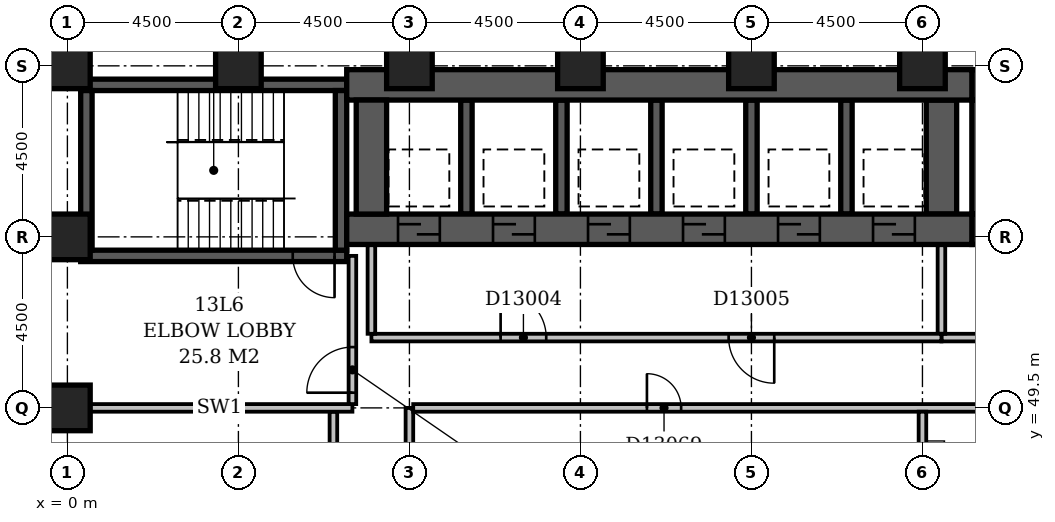
"""IFC4 building model, lengths in metres.
Left out: names, types, materials, properties, quantities, classifications, styles, units other than length and angle.
Written with IfcOpenShell. Run it as: python <this file> out.ifc"""

import sys

from ifc_helpers import new_model, si_unit, direction, frame, frame_2d, origin, origin_2d, place, context, subcontext, project, spatial, rectangle, extrude, element, fill, save


model = new_model("IFC4")
c1 = context("Model", 3, precision=1e-05, world=origin(), true_north=direction((0.0, 1.0)))
c2 = subcontext(c1, "Body", "Model", "MODEL_VIEW")
j1 = project(units=[si_unit("LENGTHUNIT", "METRE"), si_unit("PLANEANGLEUNIT", "RADIAN")], contexts=[c1])
p1 = place(None, origin())
s1 = spatial("IfcSite", under=j1, at=p1, CompositionType="ELEMENT")
p2 = place(p1, origin())
s2 = spatial("IfcBuilding", under=s1, at=p2, CompositionType="ELEMENT")
p3 = place(p2, frame((0.0, 0.0, 57.8)))
s3 = spatial("IfcBuildingStorey", under=s2, at=p3, CompositionType="ELEMENT", Elevation=57.8)
p4 = place(p3, frame((0.35, 53.5, -0.3), z_axis=(0.0, 0.0, 1.0), x_axis=(1.0, 0.0, 0.0)))
e1 = element("IfcWall", 1, at=p4, inside=s3, PredefinedType="SHEAR", context=c2, shape_type="SweptSolid", body=[
    extrude(rectangle(XDim=7.0, YDim=0.3, at=frame_2d((3.5, 0.0))), origin(), (0.0, 0.0, 1.0), 3.6),
])
p5 = place(p4, frame((5.58, 0.0, 0.3)))
e2 = element("IfcOpeningElement", 2, at=p5, cuts=e1, PredefinedType="OPENING", context=c2, shape_type="SweptSolid", body=[
    extrude(rectangle(XDim=1.1, YDim=2.1, at=frame_2d((0.55, 1.05))), frame((0.0, 0.162, 0.0), z_axis=(0.0, -1.0, 0.0), x_axis=(1.0, 0.0, 0.0)), (0.0, 0.0, 1.0), 0.324),
])
p6 = place(p3, frame((0.35, 58.0, -0.3), z_axis=(0.0, 0.0, 1.0), x_axis=(1.0, 0.0, 0.0)))
e3 = element("IfcWall", 3, at=p6, inside=s3, PredefinedType="SHEAR", context=c2, shape_type="SweptSolid", body=[
    extrude(rectangle(XDim=7.0, YDim=0.3, at=frame_2d((3.5, 0.0))), origin(), (0.0, 0.0, 1.0), 3.6),
])
for number, where, z_axis, x_axis in (
    (4, (0.5, 53.65, -0.3), (0.0, 0.0, 1.0), (0.0, 1.0, 0.0)),
    (5, (7.2, 53.65, -0.3), (0.0, 0.0, 1.0), (0.0, 1.0, 0.0)),
):
    element("IfcWall", number, at=place(p3, frame(where, z_axis=z_axis, x_axis=x_axis)), inside=s3, PredefinedType="SHEAR", context=c2, shape_type="SweptSolid", body=[
        extrude(rectangle(XDim=4.2, YDim=0.3, at=frame_2d((2.1, 0.0))), origin(), (0.0, 0.0, 1.0), 3.6),
    ])
p7 = place(p3, frame((7.35, 54.2, -0.3), z_axis=(0.0, 0.0, 1.0), x_axis=(1.0, 0.0, 0.0)))
e6 = element("IfcWall", 6, at=p7, inside=s3, PredefinedType="SHEAR", context=c2, shape_type="SweptSolid", body=[
    extrude(rectangle(XDim=16.45, YDim=0.8, at=frame_2d((8.225, 0.0))), origin(), (0.0, 0.0, 1.0), 3.6),
])
p8 = place(p7, frame((1.35, 0.0, 0.3)))
e7 = element("IfcOpeningElement", 7, at=p8, cuts=e6, PredefinedType="OPENING", context=c2, shape_type="SweptSolid", body=[
    extrude(rectangle(XDim=1.1, YDim=2.1, at=frame_2d((0.55, 1.05))), frame((0.0, 0.412, 0.0), z_axis=(0.0, -1.0, 0.0), x_axis=(1.0, 0.0, 0.0)), (0.0, 0.0, 1.0), 0.824),
])
p9 = place(p7, frame((3.85, 0.0, 0.3)))
e8 = element("IfcOpeningElement", 8, at=p9, cuts=e6, PredefinedType="OPENING", context=c2, shape_type="SweptSolid", body=[
    extrude(rectangle(XDim=1.1, YDim=2.1, at=frame_2d((0.55, 1.05))), frame((0.0, 0.412, 0.0), z_axis=(0.0, -1.0, 0.0), x_axis=(1.0, 0.0, 0.0)), (0.0, 0.0, 1.0), 0.824),
])
p10 = place(p7, frame((6.35, 0.0, 0.3)))
e9 = element("IfcOpeningElement", 9, at=p10, cuts=e6, PredefinedType="OPENING", context=c2, shape_type="SweptSolid", body=[
    extrude(rectangle(XDim=1.1, YDim=2.1, at=frame_2d((0.55, 1.05))), frame((0.0, 0.412, 0.0), z_axis=(0.0, -1.0, 0.0), x_axis=(1.0, 0.0, 0.0)), (0.0, 0.0, 1.0), 0.824),
])
p11 = place(p7, frame((8.85, 0.0, 0.3)))
e10 = element("IfcOpeningElement", 10, at=p11, cuts=e6, PredefinedType="OPENING", context=c2, shape_type="SweptSolid", body=[
    extrude(rectangle(XDim=1.1, YDim=2.1, at=frame_2d((0.55, 1.05))), frame((0.0, 0.412, 0.0), z_axis=(0.0, -1.0, 0.0), x_axis=(1.0, 0.0, 0.0)), (0.0, 0.0, 1.0), 0.824),
])
p12 = place(p7, frame((11.35, 0.0, 0.3)))
e11 = element("IfcOpeningElement", 11, at=p12, cuts=e6, PredefinedType="OPENING", context=c2, shape_type="SweptSolid", body=[
    extrude(rectangle(XDim=1.1, YDim=2.1, at=frame_2d((0.55, 1.05))), frame((0.0, 0.412, 0.0), z_axis=(0.0, -1.0, 0.0), x_axis=(1.0, 0.0, 0.0)), (0.0, 0.0, 1.0), 0.824),
])
p13 = place(p7, frame((13.85, 0.0, 0.3)))
e12 = element("IfcOpeningElement", 12, at=p13, cuts=e6, PredefinedType="OPENING", context=c2, shape_type="SweptSolid", body=[
    extrude(rectangle(XDim=1.1, YDim=2.1, at=frame_2d((0.55, 1.05))), frame((0.0, 0.412, 0.0), z_axis=(0.0, -1.0, 0.0), x_axis=(1.0, 0.0, 0.0)), (0.0, 0.0, 1.0), 0.824),
])
p14 = place(p3, frame((7.35, 58.0, -0.3), z_axis=(0.0, 0.0, 1.0), x_axis=(1.0, 0.0, 0.0)))
e13 = element("IfcWall", 13, at=p14, inside=s3, PredefinedType="SHEAR", context=c2, shape_type="SweptSolid", body=[
    extrude(rectangle(XDim=16.45, YDim=0.8, at=frame_2d((8.225, 0.0))), origin(), (0.0, 0.0, 1.0), 3.6),
])
p15 = place(p3, frame((8.0, 54.6, -0.3), z_axis=(0.0, 0.0, 1.0), x_axis=(0.0, 1.0, 0.0)))
e14 = element("IfcWall", 14, at=p15, inside=s3, PredefinedType="SHEAR", context=c2, shape_type="SweptSolid", body=[
    extrude(rectangle(XDim=3.0, YDim=0.8, at=frame_2d((1.5, 0.0))), origin(), (0.0, 0.0, 1.0), 3.6),
])
for number, where, z_axis, x_axis in (
    (15, (10.5, 54.6, -0.3), (0.0, 0.0, 1.0), (0.0, 1.0, 0.0)),
    (16, (13.0, 54.6, -0.3), (0.0, 0.0, 1.0), (0.0, 1.0, 0.0)),
    (17, (15.5, 54.6, -0.3), (0.0, 0.0, 1.0), (0.0, 1.0, 0.0)),
    (18, (18.0, 54.6, -0.3), (0.0, 0.0, 1.0), (0.0, 1.0, 0.0)),
    (19, (20.5, 54.6, -0.3), (0.0, 0.0, 1.0), (0.0, 1.0, 0.0)),
):
    element("IfcWall", number, at=place(p3, frame(where, z_axis=z_axis, x_axis=x_axis)), inside=s3, PredefinedType="SHEAR", context=c2, shape_type="SweptSolid", body=[
        extrude(rectangle(XDim=3.0, YDim=0.3, at=frame_2d((1.5, 0.0))), origin(), (0.0, 0.0, 1.0), 3.6),
    ])
p16 = place(p3, frame((23.0, 54.6, -0.3), z_axis=(0.0, 0.0, 1.0), x_axis=(0.0, 1.0, 0.0)))
e20 = element("IfcWall", 20, at=p16, inside=s3, PredefinedType="SHEAR", context=c2, shape_type="SweptSolid", body=[
    extrude(rectangle(XDim=3.0, YDim=0.8, at=frame_2d((1.5, 0.0))), origin(), (0.0, 0.0, 1.0), 3.6),
])
p17 = place(p3, frame((23.8, 54.2, -0.3), z_axis=(0.0, 0.0, 1.0), x_axis=(1.0, 0.0, 0.0)))
e21 = element("IfcWall", 21, at=p17, inside=s3, PredefinedType="SHEAR", context=c2, shape_type="SweptSolid", body=[
    extrude(rectangle(XDim=3.3, YDim=0.8, at=frame_2d((1.65, 0.0))), origin(), (0.0, 0.0, 1.0), 3.6),
])
p18 = place(p17, frame((1.1, 0.0, 0.3)))
e22 = element("IfcOpeningElement", 22, at=p18, cuts=e21, PredefinedType="OPENING", context=c2, shape_type="SweptSolid", body=[
    extrude(rectangle(XDim=1.1, YDim=2.1, at=frame_2d((0.55, 1.05))), frame((0.0, 0.412, 0.0), z_axis=(0.0, -1.0, 0.0), x_axis=(1.0, 0.0, 0.0)), (0.0, 0.0, 1.0), 0.824),
])
p19 = place(p3, frame((23.8, 58.0, -0.3), z_axis=(0.0, 0.0, 1.0), x_axis=(1.0, 0.0, 0.0)))
e23 = element("IfcWall", 23, at=p19, inside=s3, PredefinedType="SHEAR", context=c2, shape_type="SweptSolid", body=[
    extrude(rectangle(XDim=3.3, YDim=0.8, at=frame_2d((1.65, 0.0))), origin(), (0.0, 0.0, 1.0), 3.6),
])
p20 = place(p3, frame((24.2, 54.6, -0.3), z_axis=(0.0, 0.0, 1.0), x_axis=(0.0, 1.0, 0.0)))
e24 = element("IfcWall", 24, at=p20, inside=s3, PredefinedType="SHEAR", context=c2, shape_type="SweptSolid", body=[
    extrude(rectangle(XDim=3.0, YDim=0.8, at=frame_2d((1.5, 0.0))), origin(), (0.0, 0.0, 1.0), 3.6),
])
for number, where, z_axis, x_axis in (
    (25, (0.0, 49.5, -0.3), (0.0, 0.0, 1.0), (1.0, 0.0, 0.0)),
    (26, (0.0, 54.0, -0.3), (0.0, 0.0, 1.0), (1.0, 0.0, 0.0)),
    (27, (0.0, 58.5, -0.3), (0.0, 0.0, 1.0), (1.0, 0.0, 0.0)),
    (28, (4.5, 58.5, -0.3), (0.0, 0.0, 1.0), (1.0, 0.0, 0.0)),
    (29, (9.0, 58.5, -0.3), (0.0, 0.0, 1.0), (1.0, 0.0, 0.0)),
    (30, (13.5, 58.5, -0.3), (0.0, 0.0, 1.0), (1.0, 0.0, 0.0)),
    (31, (18.0, 58.5, -0.3), (0.0, 0.0, 1.0), (1.0, 0.0, 0.0)),
    (32, (22.5, 58.5, -0.3), (0.0, 0.0, 1.0), (1.0, 0.0, 0.0)),
):
    element("IfcColumn", number, at=place(p3, frame(where, z_axis=z_axis, x_axis=x_axis)), inside=s3, PredefinedType="COLUMN", context=c2, shape_type="SweptSolid", body=[
        extrude(rectangle(XDim=1.2, YDim=1.2, at=origin_2d()), origin(), (0.0, 0.0, 1.0), 3.6),
    ])
p21 = place(p3, frame((8.0, 51.35, 0.0), z_axis=(0.0, 0.0, 1.0), x_axis=(1.0, 0.0, 0.0)))
e33 = element("IfcWall", 33, at=p21, inside=s3, PredefinedType="PARTITIONING", context=c2, shape_type="SweptSolid", body=[
    extrude(rectangle(XDim=15.0, YDim=0.2, at=frame_2d((7.5, 0.0))), origin(), (0.0, 0.0, 1.0), 3.3),
])
p22 = place(p21, frame((3.4, 0.0, 0.0)))
e34 = element("IfcOpeningElement", 34, at=p22, cuts=e33, PredefinedType="OPENING", context=c2, shape_type="SweptSolid", body=[
    extrude(rectangle(XDim=1.2, YDim=2.1, at=frame_2d((0.6, 1.05))), frame((0.0, 0.112, 0.0), z_axis=(0.0, -1.0, 0.0), x_axis=(1.0, 0.0, 0.0)), (0.0, 0.0, 1.0), 0.224),
])
p23 = place(p21, frame((9.4, 0.0, 0.0)))
e35 = element("IfcOpeningElement", 35, at=p23, cuts=e33, PredefinedType="OPENING", context=c2, shape_type="SweptSolid", body=[
    extrude(rectangle(XDim=1.2, YDim=2.1, at=frame_2d((0.6, 1.05))), frame((0.0, 0.112, 0.0), z_axis=(0.0, -1.0, 0.0), x_axis=(1.0, 0.0, 0.0)), (0.0, 0.0, 1.0), 0.224),
])
for number, where, z_axis, x_axis in (
    (36, (23.0, 51.45, 0.0), (0.0, 0.0, 1.0), (0.0, 1.0, 0.0)),
    (37, (8.0, 51.45, 0.0), (0.0, 0.0, 1.0), (0.0, 1.0, 0.0)),
):
    element("IfcWall", number, at=place(p3, frame(where, z_axis=z_axis, x_axis=x_axis)), inside=s3, PredefinedType="PARTITIONING", context=c2, shape_type="SweptSolid", body=[
        extrude(rectangle(XDim=2.33, YDim=0.2, at=frame_2d((1.165, 0.0))), origin(), (0.0, 0.0, 1.0), 3.3),
    ])
p24 = place(p3, frame((23.0, 51.35, 0.0), z_axis=(0.0, 0.0, 1.0), x_axis=(1.0, 0.0, 0.0)))
e38 = element("IfcWall", 38, at=p24, inside=s3, PredefinedType="PARTITIONING", context=c2, shape_type="SweptSolid", body=[
    extrude(rectangle(XDim=4.8, YDim=0.2, at=frame_2d((2.4, 0.0))), origin(), (0.0, 0.0, 1.0), 3.3),
])
p25 = place(p24, frame((1.65, 0.0, 0.0)))
e39 = element("IfcOpeningElement", 39, at=p25, cuts=e38, PredefinedType="OPENING", context=c2, shape_type="SweptSolid", body=[
    extrude(rectangle(XDim=1.2, YDim=2.1, at=frame_2d((0.6, 1.05))), frame((0.0, 0.112, 0.0), z_axis=(0.0, -1.0, 0.0), x_axis=(1.0, 0.0, 0.0)), (0.0, 0.0, 1.0), 0.224),
])
p26 = place(p3, frame((0.5, 49.5, 0.0), z_axis=(0.0, 0.0, 1.0), x_axis=(1.0, 0.0, 0.0)))
e40 = element("IfcWall", 40, at=p26, inside=s3, PredefinedType="PARTITIONING", context=c2, shape_type="SweptSolid", body=[
    extrude(rectangle(XDim=7.0, YDim=0.2, at=frame_2d((3.5, 0.0))), origin(), (0.0, 0.0, 1.0), 3.3),
])
p27 = place(p3, frame((7.5, 49.6, 0.0), z_axis=(0.0, 0.0, 1.0), x_axis=(0.0, 1.0, 0.0)))
e41 = element("IfcWall", 41, at=p27, inside=s3, PredefinedType="PARTITIONING", context=c2, shape_type="SweptSolid", body=[
    extrude(rectangle(XDim=3.9, YDim=0.2, at=frame_2d((1.95, 0.0))), origin(), (0.0, 0.0, 1.0), 3.3),
])
p28 = place(p27, frame((0.3, 0.0, 0.0)))
e42 = element("IfcOpeningElement", 42, at=p28, cuts=e41, PredefinedType="OPENING", context=c2, shape_type="SweptSolid", body=[
    extrude(rectangle(XDim=1.2, YDim=2.1, at=frame_2d((0.6, 1.05))), frame((0.0, 0.112, 0.0), z_axis=(0.0, -1.0, 0.0), x_axis=(1.0, 0.0, 0.0)), (0.0, 0.0, 1.0), 0.224),
])
p29 = place(p3, frame((9.0, 5.0, 0.0), z_axis=(0.0, 0.0, 1.0), x_axis=(0.0, 1.0, 0.0)))
e43 = element("IfcWall", 43, at=p29, inside=s3, PredefinedType="PARTITIONING", context=c2, shape_type="SweptSolid", body=[
    extrude(rectangle(XDim=44.5, YDim=0.2, at=frame_2d((22.25, 0.0))), origin(), (0.0, 0.0, 1.0), 3.3),
])
p30 = place(p29, frame((28.05, 0.0, 0.0)))
e44 = element("IfcOpeningElement", 44, at=p30, cuts=e43, PredefinedType="OPENING", context=c2, shape_type="SweptSolid", body=[
    extrude(rectangle(XDim=1.0, YDim=2.1, at=frame_2d((0.5, 1.05))), frame((0.0, 0.112, 0.0), z_axis=(0.0, -1.0, 0.0), x_axis=(1.0, 0.0, 0.0)), (0.0, 0.0, 1.0), 0.224),
])
p31 = place(p29, frame((23.95, 0.0, 0.0)))
e45 = element("IfcOpeningElement", 45, at=p31, cuts=e43, PredefinedType="OPENING", context=c2, shape_type="SweptSolid", body=[
    extrude(rectangle(XDim=1.0, YDim=2.1, at=frame_2d((0.5, 1.05))), frame((0.0, 0.112, 0.0), z_axis=(0.0, -1.0, 0.0), x_axis=(1.0, 0.0, 0.0)), (0.0, 0.0, 1.0), 0.224),
])
p32 = place(p29, frame((18.3, 0.0, 0.0)))
e46 = element("IfcOpeningElement", 46, at=p32, cuts=e43, PredefinedType="OPENING", context=c2, shape_type="SweptSolid", body=[
    extrude(rectangle(XDim=1.0, YDim=2.1, at=frame_2d((0.5, 1.05))), frame((0.0, 0.112, 0.0), z_axis=(0.0, -1.0, 0.0), x_axis=(1.0, 0.0, 0.0)), (0.0, 0.0, 1.0), 0.224),
])
p33 = place(p29, frame((9.3, 0.0, 0.0)))
e47 = element("IfcOpeningElement", 47, at=p33, cuts=e43, PredefinedType="OPENING", context=c2, shape_type="SweptSolid", body=[
    extrude(rectangle(XDim=1.0, YDim=2.1, at=frame_2d((0.5, 1.05))), frame((0.0, 0.112, 0.0), z_axis=(0.0, -1.0, 0.0), x_axis=(1.0, 0.0, 0.0)), (0.0, 0.0, 1.0), 0.224),
])
p34 = place(p29, frame((32.75, 0.0, 0.0)))
e48 = element("IfcOpeningElement", 48, at=p34, cuts=e43, PredefinedType="OPENING", context=c2, shape_type="SweptSolid", body=[
    extrude(rectangle(XDim=0.9, YDim=2.1, at=frame_2d((0.45, 1.05))), frame((0.0, 0.112, 0.0), z_axis=(0.0, -1.0, 0.0), x_axis=(1.0, 0.0, 0.0)), (0.0, 0.0, 1.0), 0.224),
])
p35 = place(p29, frame((1.5, 0.0, 0.0)))
e49 = element("IfcOpeningElement", 49, at=p35, cuts=e43, PredefinedType="OPENING", context=c2, shape_type="SweptSolid", body=[
    extrude(rectangle(XDim=0.9, YDim=2.1, at=frame_2d((0.45, 1.05))), frame((0.0, 0.112, 0.0), z_axis=(0.0, -1.0, 0.0), x_axis=(1.0, 0.0, 0.0)), (0.0, 0.0, 1.0), 0.224),
])
p36 = place(p3, frame((7.0, 34.6, 0.0), z_axis=(0.0, 0.0, 1.0), x_axis=(0.0, 1.0, 0.0)))
e50 = element("IfcWall", 50, at=p36, inside=s3, PredefinedType="PARTITIONING", context=c2, shape_type="SweptSolid", body=[
    extrude(rectangle(XDim=14.8, YDim=0.2, at=frame_2d((7.4, 0.0))), origin(), (0.0, 0.0, 1.0), 3.3),
])
p37 = place(p36, frame((6.95, 0.0, 0.0)))
e51 = element("IfcOpeningElement", 51, at=p37, cuts=e50, PredefinedType="OPENING", context=c2, shape_type="SweptSolid", body=[
    extrude(rectangle(XDim=0.9, YDim=2.1, at=frame_2d((0.45, 1.05))), frame((0.0, 0.112, 0.0), z_axis=(0.0, -1.0, 0.0), x_axis=(1.0, 0.0, 0.0)), (0.0, 0.0, 1.0), 0.224),
])
p38 = place(p3, frame((22.5, 36.6, 0.0), z_axis=(0.0, 0.0, 1.0), x_axis=(0.0, 1.0, 0.0)))
e52 = element("IfcWall", 52, at=p38, inside=s3, PredefinedType="PARTITIONING", context=c2, shape_type="SweptSolid", body=[
    extrude(rectangle(XDim=12.8, YDim=0.2, at=frame_2d((6.4, 0.0))), origin(), (0.0, 0.0, 1.0), 3.3),
])
p39 = place(p3, frame((9.1, 49.5, 0.0), z_axis=(0.0, 0.0, 1.0), x_axis=(1.0, 0.0, 0.0)))
e53 = element("IfcWall", 53, at=p39, inside=s3, PredefinedType="PARTITIONING", context=c2, shape_type="SweptSolid", body=[
    extrude(rectangle(XDim=57.8, YDim=0.2, at=frame_2d((28.9, 0.0))), origin(), (0.0, 0.0, 1.0), 3.3),
])
p40 = place(p39, frame((15.35, 0.0, 0.0)))
e54 = element("IfcOpeningElement", 54, at=p40, cuts=e53, PredefinedType="OPENING", context=c2, shape_type="SweptSolid", body=[
    extrude(rectangle(XDim=1.0, YDim=2.1, at=frame_2d((0.5, 1.05))), frame((0.0, 0.112, 0.0), z_axis=(0.0, -1.0, 0.0), x_axis=(1.0, 0.0, 0.0)), (0.0, 0.0, 1.0), 0.224),
])
p41 = place(p39, frame((18.2, 0.0, 0.0)))
e55 = element("IfcOpeningElement", 55, at=p41, cuts=e53, PredefinedType="OPENING", context=c2, shape_type="SweptSolid", body=[
    extrude(rectangle(XDim=1.0, YDim=2.1, at=frame_2d((0.5, 1.05))), frame((0.0, 0.112, 0.0), z_axis=(0.0, -1.0, 0.0), x_axis=(1.0, 0.0, 0.0)), (0.0, 0.0, 1.0), 0.224),
])
p42 = place(p39, frame((39.6, 0.0, 0.0)))
e56 = element("IfcOpeningElement", 56, at=p42, cuts=e53, PredefinedType="OPENING", context=c2, shape_type="SweptSolid", body=[
    extrude(rectangle(XDim=1.0, YDim=2.1, at=frame_2d((0.5, 1.05))), frame((0.0, 0.112, 0.0), z_axis=(0.0, -1.0, 0.0), x_axis=(1.0, 0.0, 0.0)), (0.0, 0.0, 1.0), 0.224),
])
p43 = place(p39, frame((45.2, 0.0, 0.0)))
e57 = element("IfcOpeningElement", 57, at=p43, cuts=e53, PredefinedType="OPENING", context=c2, shape_type="SweptSolid", body=[
    extrude(rectangle(XDim=1.0, YDim=2.1, at=frame_2d((0.5, 1.05))), frame((0.0, 0.112, 0.0), z_axis=(0.0, -1.0, 0.0), x_axis=(1.0, 0.0, 0.0)), (0.0, 0.0, 1.0), 0.224),
])
p44 = place(p39, frame((54.15, 0.0, 0.0)))
e58 = element("IfcOpeningElement", 58, at=p44, cuts=e53, PredefinedType="OPENING", context=c2, shape_type="SweptSolid", body=[
    extrude(rectangle(XDim=1.0, YDim=2.1, at=frame_2d((0.5, 1.05))), frame((0.0, 0.112, 0.0), z_axis=(0.0, -1.0, 0.0), x_axis=(1.0, 0.0, 0.0)), (0.0, 0.0, 1.0), 0.224),
])
p45 = place(p39, frame((6.15, 0.0, 0.0)))
e59 = element("IfcOpeningElement", 59, at=p45, cuts=e53, PredefinedType="OPENING", context=c2, shape_type="SweptSolid", body=[
    extrude(rectangle(XDim=0.9, YDim=2.1, at=frame_2d((0.45, 1.05))), frame((0.0, 0.112, 0.0), z_axis=(0.0, -1.0, 0.0), x_axis=(1.0, 0.0, 0.0)), (0.0, 0.0, 1.0), 0.224),
])
p46 = place(p28, origin())
e60 = element("IfcDoor", 60, at=p46, inside=s3, OperationType="SINGLE_SWING_LEFT", PredefinedType="DOOR", context=c2, shape_type="SweptSolid", body=[
    extrude(rectangle(XDim=1.2, YDim=2.1, at=frame_2d((0.6, 1.05))), frame((0.0, 0.025, 0.0), z_axis=(0.0, -1.0, 0.0), x_axis=(1.0, 0.0, 0.0)), (0.0, 0.0, 1.0), 0.05),
])
fill(e42, e60)
p47 = place(p8, origin())
e61 = element("IfcDoor", 61, at=p47, inside=s3, OperationType="SLIDING_TO_LEFT", PredefinedType="DOOR", context=c2, shape_type="SweptSolid", body=[
    extrude(rectangle(XDim=1.1, YDim=2.1, at=frame_2d((0.55, 1.05))), frame((0.0, 0.025, 0.0), z_axis=(0.0, -1.0, 0.0), x_axis=(1.0, 0.0, 0.0)), (0.0, 0.0, 1.0), 0.05),
])
fill(e7, e61)
p48 = place(p9, origin())
e62 = element("IfcDoor", 62, at=p48, inside=s3, OperationType="SLIDING_TO_LEFT", PredefinedType="DOOR", context=c2, shape_type="SweptSolid", body=[
    extrude(rectangle(XDim=1.1, YDim=2.1, at=frame_2d((0.55, 1.05))), frame((0.0, 0.025, 0.0), z_axis=(0.0, -1.0, 0.0), x_axis=(1.0, 0.0, 0.0)), (0.0, 0.0, 1.0), 0.05),
])
fill(e8, e62)
p49 = place(p10, origin())
e63 = element("IfcDoor", 63, at=p49, inside=s3, OperationType="SLIDING_TO_LEFT", PredefinedType="DOOR", context=c2, shape_type="SweptSolid", body=[
    extrude(rectangle(XDim=1.1, YDim=2.1, at=frame_2d((0.55, 1.05))), frame((0.0, 0.025, 0.0), z_axis=(0.0, -1.0, 0.0), x_axis=(1.0, 0.0, 0.0)), (0.0, 0.0, 1.0), 0.05),
])
fill(e9, e63)
p50 = place(p11, origin())
e64 = element("IfcDoor", 64, at=p50, inside=s3, OperationType="SLIDING_TO_LEFT", PredefinedType="DOOR", context=c2, shape_type="SweptSolid", body=[
    extrude(rectangle(XDim=1.1, YDim=2.1, at=frame_2d((0.55, 1.05))), frame((0.0, 0.025, 0.0), z_axis=(0.0, -1.0, 0.0), x_axis=(1.0, 0.0, 0.0)), (0.0, 0.0, 1.0), 0.05),
])
fill(e10, e64)
p51 = place(p12, origin())
e65 = element("IfcDoor", 65, at=p51, inside=s3, OperationType="SLIDING_TO_LEFT", PredefinedType="DOOR", context=c2, shape_type="SweptSolid", body=[
    extrude(rectangle(XDim=1.1, YDim=2.1, at=frame_2d((0.55, 1.05))), frame((0.0, 0.025, 0.0), z_axis=(0.0, -1.0, 0.0), x_axis=(1.0, 0.0, 0.0)), (0.0, 0.0, 1.0), 0.05),
])
fill(e11, e65)
p52 = place(p13, origin())
e66 = element("IfcDoor", 66, at=p52, inside=s3, OperationType="SLIDING_TO_LEFT", PredefinedType="DOOR", context=c2, shape_type="SweptSolid", body=[
    extrude(rectangle(XDim=1.1, YDim=2.1, at=frame_2d((0.55, 1.05))), frame((0.0, 0.025, 0.0), z_axis=(0.0, -1.0, 0.0), x_axis=(1.0, 0.0, 0.0)), (0.0, 0.0, 1.0), 0.05),
])
fill(e12, e66)
p53 = place(p22, origin())
e67 = element("IfcDoor", 67, at=p53, inside=s3, OperationType="SINGLE_SWING_LEFT", PredefinedType="DOOR", context=c2, shape_type="SweptSolid", body=[
    extrude(rectangle(XDim=1.2, YDim=2.1, at=frame_2d((0.6, 1.05))), frame((0.0, 0.025, 0.0), z_axis=(0.0, -1.0, 0.0), x_axis=(1.0, 0.0, 0.0)), (0.0, 0.0, 1.0), 0.05),
])
fill(e34, e67)
p54 = place(p23, origin())
e68 = element("IfcDoor", 68, at=p54, inside=s3, OperationType="SINGLE_SWING_RIGHT", PredefinedType="DOOR", context=c2, shape_type="SweptSolid", body=[
    extrude(rectangle(XDim=1.2, YDim=2.1, at=frame_2d((0.6, 1.05))), frame((0.0, 0.025, 0.0), z_axis=(0.0, -1.0, 0.0), x_axis=(1.0, 0.0, 0.0)), (0.0, 0.0, 1.0), 0.05),
])
fill(e35, e68)
p55 = place(p5, origin())
e69 = element("IfcDoor", 69, at=p55, inside=s3, OperationType="SINGLE_SWING_RIGHT", PredefinedType="DOOR", context=c2, shape_type="SweptSolid", body=[
    extrude(rectangle(XDim=1.1, YDim=2.1, at=frame_2d((0.55, 1.05))), frame((0.0, 0.025, 0.0), z_axis=(0.0, -1.0, 0.0), x_axis=(1.0, 0.0, 0.0)), (0.0, 0.0, 1.0), 0.05),
])
fill(e2, e69)
p56 = place(p45, origin())
e70 = element("IfcDoor", 70, at=p56, inside=s3, OperationType="SINGLE_SWING_LEFT", PredefinedType="DOOR", context=c2, shape_type="SweptSolid", body=[
    extrude(rectangle(XDim=0.9, YDim=2.1, at=frame_2d((0.45, 1.05))), frame((0.0, 0.025, 0.0), z_axis=(0.0, -1.0, 0.0), x_axis=(1.0, 0.0, 0.0)), (0.0, 0.0, 1.0), 0.05),
])
fill(e59, e70)
save(model, sys.argv[1])
